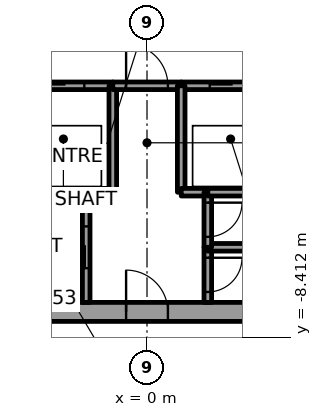
"""IFC4 building model, lengths in metres.
Left out: names, types, materials, properties, quantities, classifications, styles, units other than length and angle.
Written with IfcOpenShell. Run it as: python <this file> out.ifc"""

import sys

from ifc_helpers import new_model, si_unit, direction, frame, frame_2d, origin, place, context, subcontext, project, spatial, rectangle, extrude, element, fill, save


model = new_model("IFC4")
c1 = context("Model", 3, precision=1e-05, world=origin(), true_north=direction((0.0, 1.0)))
c2 = subcontext(c1, "Body", "Model", "MODEL_VIEW")
j1 = project(units=[si_unit("LENGTHUNIT", "METRE"), si_unit("PLANEANGLEUNIT", "RADIAN")], contexts=[c1])
p1 = place(None, origin())
s1 = spatial("IfcSite", under=j1, at=p1, CompositionType="ELEMENT")
p2 = place(p1, origin())
s2 = spatial("IfcBuilding", under=s1, at=p2, CompositionType="ELEMENT")
p3 = place(p2, frame((0.0, 0.0, 66.5)))
s3 = spatial("IfcBuildingStorey", under=s2, at=p3, CompositionType="ELEMENT", Elevation=66.5)
p4 = place(p3, frame((-11.0, -7.75, 0.0), z_axis=(0.0, 0.0, 1.0), x_axis=(1.0, 0.0, 0.0)))
e1 = element("IfcWall", 1, at=p4, inside=s3, PredefinedType="SHEAR", context=c2, shape_type="SweptSolid", body=[
    extrude(rectangle(XDim=22.0, YDim=0.5, at=frame_2d((11.0, 0.0))), origin(), (0.0, 0.0, 1.0), 3.7),
])
p5 = place(p4, frame((10.45, 0.0, 0.0)))
e2 = element("IfcOpeningElement", 2, at=p5, cuts=e1, PredefinedType="OPENING", context=c2, shape_type="SweptSolid", body=[
    extrude(rectangle(XDim=1.1, YDim=2.1, at=frame_2d((0.55, 1.05))), frame((0.0, 0.25, 0.0), z_axis=(0.0, -1.0, 0.0), x_axis=(1.0, 0.0, 0.0)), (0.0, 0.0, 1.0), 0.5),
])
p6 = place(p3, frame((-3.5, -4.6, 0.0), z_axis=(0.0, 0.0, 1.0), x_axis=(1.0, 0.0, 0.0)))
e3 = element("IfcWall", 3, at=p6, inside=s3, PredefinedType="SOLIDWALL", context=c2, shape_type="SweptSolid", body=[
    extrude(rectangle(XDim=1.9, YDim=0.2, at=frame_2d((0.95, 0.0))), origin(), (0.0, 0.0, 1.0), 3.55),
])
p7 = place(p3, frame((-3.5, -1.8, 0.0), z_axis=(0.0, 0.0, 1.0), x_axis=(1.0, 0.0, 0.0)))
e4 = element("IfcWall", 4, at=p7, inside=s3, PredefinedType="SOLIDWALL", context=c2, shape_type="SweptSolid", body=[
    extrude(rectangle(XDim=2.6, YDim=0.2, at=frame_2d((1.3, 0.0))), origin(), (0.0, 0.0, 1.0), 3.55),
])
p8 = place(p7, frame((0.75, 0.0, 0.0)))
e5 = element("IfcOpeningElement", 5, at=p8, cuts=e4, PredefinedType="OPENING", context=c2, shape_type="SweptSolid", body=[
    extrude(rectangle(XDim=1.1, YDim=2.1, at=frame_2d((0.55, 1.05))), frame((0.0, 0.1, 0.0), z_axis=(0.0, -1.0, 0.0), x_axis=(1.0, 0.0, 0.0)), (0.0, 0.0, 1.0), 0.2),
])
p9 = place(p3, frame((-1.6, -7.5, 0.0), z_axis=(0.0, 0.0, 1.0), x_axis=(0.0, 1.0, 0.0)))
e6 = element("IfcWall", 6, at=p9, inside=s3, PredefinedType="SOLIDWALL", context=c2, shape_type="SweptSolid", body=[
    extrude(rectangle(XDim=2.9, YDim=0.2, at=frame_2d((1.45, 0.0))), origin(), (0.0, 0.0, 1.0), 3.55),
])
p10 = place(p9, frame((0.9, 0.0, 0.0)))
e7 = element("IfcOpeningElement", 7, at=p10, cuts=e6, PredefinedType="OPENING", context=c2, shape_type="SweptSolid", body=[
    extrude(rectangle(XDim=1.1, YDim=2.1, at=frame_2d((0.55, 1.05))), frame((0.0, 0.1, 0.0), z_axis=(0.0, -1.0, 0.0), x_axis=(1.0, 0.0, 0.0)), (0.0, 0.0, 1.0), 0.2),
])
p11 = place(p3, frame((-1.6, -4.6, 0.0), z_axis=(0.0, 0.0, 1.0), x_axis=(1.0, 0.0, 0.0)))
e8 = element("IfcWall", 8, at=p11, inside=s3, PredefinedType="SOLIDWALL", context=c2, shape_type="SweptSolid", body=[
    extrude(rectangle(XDim=0.7, YDim=0.2, at=frame_2d((0.35, 0.0))), origin(), (0.0, 0.0, 1.0), 3.55),
])
p12 = place(p3, frame((-0.9, -4.6, 0.0), z_axis=(0.0, 0.0, 1.0), x_axis=(0.0, 1.0, 0.0)))
e9 = element("IfcWall", 9, at=p12, inside=s3, PredefinedType="SOLIDWALL", context=c2, shape_type="SweptSolid", body=[
    extrude(rectangle(XDim=2.8, YDim=0.2, at=frame_2d((1.4, 0.0))), origin(), (0.0, 0.0, 1.0), 3.55),
])
p13 = place(p3, frame((-0.9, -1.8, 0.0), z_axis=(0.0, 0.0, 1.0), x_axis=(1.0, 0.0, 0.0)))
e10 = element("IfcWall", 10, at=p13, inside=s3, PredefinedType="SOLIDWALL", context=c2, shape_type="SweptSolid", body=[
    extrude(rectangle(XDim=1.8, YDim=0.2, at=frame_2d((0.9, 0.0))), origin(), (0.0, 0.0, 1.0), 3.55),
])
p14 = place(p13, frame((0.35, 0.0, 0.0)))
e11 = element("IfcOpeningElement", 11, at=p14, cuts=e10, PredefinedType="OPENING", context=c2, shape_type="SweptSolid", body=[
    extrude(rectangle(XDim=1.1, YDim=2.1, at=frame_2d((0.55, 1.05))), frame((0.0, 0.1, 0.0), z_axis=(0.0, -1.0, 0.0), x_axis=(1.0, 0.0, 0.0)), (0.0, 0.0, 1.0), 0.2),
])
p15 = place(p3, frame((0.9, -1.8, 0.0), z_axis=(0.0, 0.0, 1.0), x_axis=(1.0, 0.0, 0.0)))
e12 = element("IfcWall", 12, at=p15, inside=s3, PredefinedType="SOLIDWALL", context=c2, shape_type="SweptSolid", body=[
    extrude(rectangle(XDim=2.6, YDim=0.2, at=frame_2d((1.3, 0.0))), origin(), (0.0, 0.0, 1.0), 3.55),
])
p16 = place(p15, frame((0.75, 0.0, 0.0)))
e13 = element("IfcOpeningElement", 13, at=p16, cuts=e12, PredefinedType="OPENING", context=c2, shape_type="SweptSolid", body=[
    extrude(rectangle(XDim=1.1, YDim=2.1, at=frame_2d((0.55, 1.05))), frame((0.0, 0.1, 0.0), z_axis=(0.0, -1.0, 0.0), x_axis=(1.0, 0.0, 0.0)), (0.0, 0.0, 1.0), 0.2),
])
p17 = place(p3, frame((0.9, -1.8, 0.0), z_axis=(0.0, 0.0, 1.0), x_axis=(0.0, -1.0, 0.0)))
e14 = element("IfcWall", 14, at=p17, inside=s3, PredefinedType="SOLIDWALL", context=c2, shape_type="SweptSolid", body=[
    extrude(rectangle(XDim=2.8, YDim=0.2, at=frame_2d((1.4, 0.0))), origin(), (0.0, 0.0, 1.0), 3.55),
])
p18 = place(p3, frame((0.9, -4.6, 0.0), z_axis=(0.0, 0.0, 1.0), x_axis=(1.0, 0.0, 0.0)))
e15 = element("IfcWall", 15, at=p18, inside=s3, PredefinedType="SOLIDWALL", context=c2, shape_type="SweptSolid", body=[
    extrude(rectangle(XDim=0.7, YDim=0.2, at=frame_2d((0.35, 0.0))), origin(), (0.0, 0.0, 1.0), 3.55),
])
p19 = place(p3, frame((1.6, -6.05, 0.0), z_axis=(0.0, 0.0, 1.0), x_axis=(0.0, -1.0, 0.0)))
e16 = element("IfcWall", 16, at=p19, inside=s3, PredefinedType="SOLIDWALL", context=c2, shape_type="SweptSolid", body=[
    extrude(rectangle(XDim=1.45, YDim=0.2, at=frame_2d((0.725, 0.0))), origin(), (0.0, 0.0, 1.0), 3.55),
])
p20 = place(p19, frame((0.275, 0.0, 0.0)))
e17 = element("IfcOpeningElement", 17, at=p20, cuts=e16, PredefinedType="OPENING", context=c2, shape_type="SweptSolid", body=[
    extrude(rectangle(XDim=0.9, YDim=2.1, at=frame_2d((0.45, 1.05))), frame((0.0, 0.1, 0.0), z_axis=(0.0, -1.0, 0.0), x_axis=(1.0, 0.0, 0.0)), (0.0, 0.0, 1.0), 0.2),
])
p21 = place(p3, frame((4.5, -6.05, 0.0), z_axis=(0.0, 0.0, 1.0), x_axis=(-1.0, 0.0, 0.0)))
e18 = element("IfcWall", 18, at=p21, inside=s3, PredefinedType="SOLIDWALL", context=c2, shape_type="SweptSolid", body=[
    extrude(rectangle(XDim=2.9, YDim=0.2, at=frame_2d((1.45, 0.0))), origin(), (0.0, 0.0, 1.0), 3.55),
])
p22 = place(p3, frame((1.6, -4.6, 0.0), z_axis=(0.0, 0.0, 1.0), x_axis=(0.0, -1.0, 0.0)))
e19 = element("IfcWall", 19, at=p22, inside=s3, PredefinedType="SOLIDWALL", context=c2, shape_type="SweptSolid", body=[
    extrude(rectangle(XDim=1.45, YDim=0.2, at=frame_2d((0.725, 0.0))), origin(), (0.0, 0.0, 1.0), 3.55),
])
p23 = place(p22, frame((0.275, 0.0, 0.0)))
e20 = element("IfcOpeningElement", 20, at=p23, cuts=e19, PredefinedType="OPENING", context=c2, shape_type="SweptSolid", body=[
    extrude(rectangle(XDim=0.9, YDim=2.1, at=frame_2d((0.45, 1.05))), frame((0.0, 0.1, 0.0), z_axis=(0.0, -1.0, 0.0), x_axis=(1.0, 0.0, 0.0)), (0.0, 0.0, 1.0), 0.2),
])
p24 = place(p3, frame((3.5, -4.6, 0.0), z_axis=(0.0, 0.0, 1.0), x_axis=(-1.0, 0.0, 0.0)))
e21 = element("IfcWall", 21, at=p24, inside=s3, PredefinedType="SOLIDWALL", context=c2, shape_type="SweptSolid", body=[
    extrude(rectangle(XDim=1.9, YDim=0.2, at=frame_2d((0.95, 0.0))), origin(), (0.0, 0.0, 1.0), 3.55),
])
p25 = place(p8, origin())
e22 = element("IfcDoor", 22, at=p25, inside=s3, OperationType="SLIDING_TO_RIGHT", PredefinedType="DOOR", context=c2, shape_type="SweptSolid", body=[
    extrude(rectangle(XDim=1.1, YDim=2.1, at=frame_2d((0.55, 1.05))), frame((0.0, 0.025, 0.0), z_axis=(0.0, -1.0, 0.0), x_axis=(1.0, 0.0, 0.0)), (0.0, 0.0, 1.0), 0.05),
])
fill(e5, e22)
p26 = place(p16, origin())
e23 = element("IfcDoor", 23, at=p26, inside=s3, OperationType="SLIDING_TO_RIGHT", PredefinedType="DOOR", context=c2, shape_type="SweptSolid", body=[
    extrude(rectangle(XDim=1.1, YDim=2.1, at=frame_2d((0.55, 1.05))), frame((0.0, 0.025, 0.0), z_axis=(0.0, -1.0, 0.0), x_axis=(1.0, 0.0, 0.0)), (0.0, 0.0, 1.0), 0.05),
])
fill(e13, e23)
p27 = place(p10, origin())
e24 = element("IfcDoor", 24, at=p27, inside=s3, OperationType="SLIDING_TO_RIGHT", PredefinedType="DOOR", context=c2, shape_type="SweptSolid", body=[
    extrude(rectangle(XDim=1.1, YDim=2.1, at=frame_2d((0.55, 1.05))), frame((0.0, 0.025, 0.0), z_axis=(0.0, -1.0, 0.0), x_axis=(1.0, 0.0, 0.0)), (0.0, 0.0, 1.0), 0.05),
])
fill(e7, e24)
p28 = place(p14, origin())
e25 = element("IfcDoor", 25, at=p28, inside=s3, OperationType="SINGLE_SWING_RIGHT", PredefinedType="DOOR", context=c2, shape_type="SweptSolid", body=[
    extrude(rectangle(XDim=1.1, YDim=2.1, at=frame_2d((0.55, 1.05))), frame((0.0, 0.025, 0.0), z_axis=(0.0, -1.0, 0.0), x_axis=(1.0, 0.0, 0.0)), (0.0, 0.0, 1.0), 0.05),
])
fill(e11, e25)
p29 = place(p20, origin())
e26 = element("IfcDoor", 26, at=p29, inside=s3, OperationType="SINGLE_SWING_RIGHT", PredefinedType="DOOR", context=c2, shape_type="SweptSolid", body=[
    extrude(rectangle(XDim=0.9, YDim=2.1, at=frame_2d((0.45, 1.05))), frame((0.0, 0.025, 0.0), z_axis=(0.0, -1.0, 0.0), x_axis=(1.0, 0.0, 0.0)), (0.0, 0.0, 1.0), 0.05),
])
fill(e17, e26)
p30 = place(p23, origin())
e27 = element("IfcDoor", 27, at=p30, inside=s3, OperationType="SINGLE_SWING_RIGHT", PredefinedType="DOOR", context=c2, shape_type="SweptSolid", body=[
    extrude(rectangle(XDim=0.9, YDim=2.1, at=frame_2d((0.45, 1.05))), frame((0.0, 0.025, 0.0), z_axis=(0.0, -1.0, 0.0), x_axis=(1.0, 0.0, 0.0)), (0.0, 0.0, 1.0), 0.05),
])
fill(e20, e27)
p31 = place(p5, origin())
e28 = element("IfcDoor", 28, at=p31, inside=s3, OperationType="SINGLE_SWING_LEFT", PredefinedType="DOOR", context=c2, shape_type="SweptSolid", body=[
    extrude(rectangle(XDim=1.1, YDim=2.1, at=frame_2d((0.55, 1.05))), frame((0.0, 0.025, 0.0), z_axis=(0.0, -1.0, 0.0), x_axis=(1.0, 0.0, 0.0)), (0.0, 0.0, 1.0), 0.05),
])
fill(e2, e28)
save(model, sys.argv[1])
